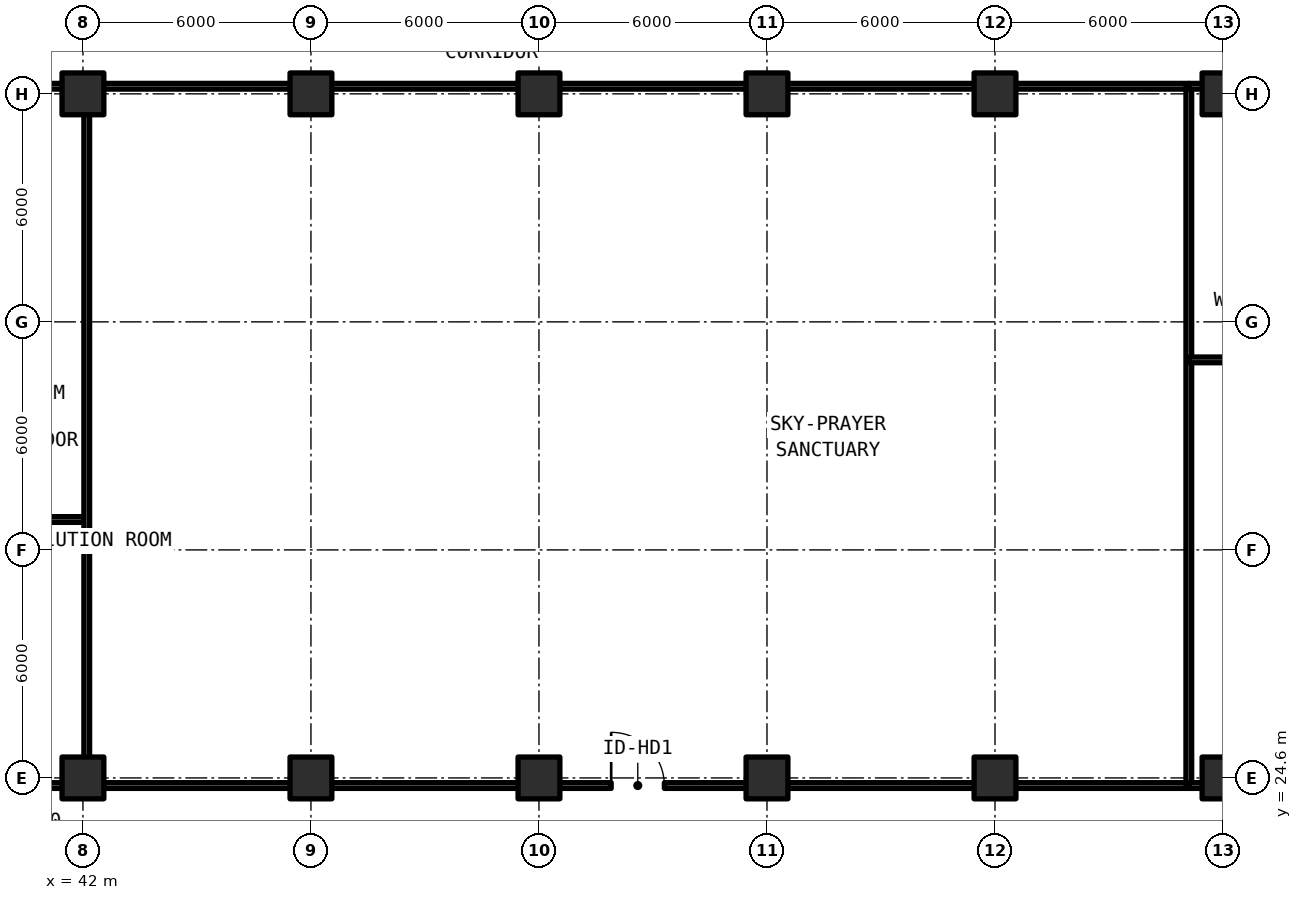
"""IFC4 building model, lengths in metres.
Left out: names, types, materials, properties, quantities, classifications, styles, units other than length and angle.
Written with IfcOpenShell. Run it as: python <this file> out.ifc"""

import sys

from ifc_helpers import new_model, si_unit, direction, frame, frame_2d, origin, origin_2d, place, context, subcontext, project, spatial, rectangle, extrude, element, fill, save


model = new_model("IFC4")
c1 = context("Model", 3, precision=1e-05, world=origin(), true_north=direction((0.0, 1.0)))
c2 = subcontext(c1, "Body", "Model", "MODEL_VIEW")
j1 = project(units=[si_unit("LENGTHUNIT", "METRE"), si_unit("PLANEANGLEUNIT", "RADIAN")], contexts=[c1])
p1 = place(None, origin())
s1 = spatial("IfcSite", under=j1, at=p1, CompositionType="ELEMENT")
p2 = place(p1, origin())
s2 = spatial("IfcBuilding", under=s1, at=p2, CompositionType="ELEMENT")
p3 = place(p2, frame((0.0, 0.0, 69.63)))
s3 = spatial("IfcBuildingStorey", under=s2, at=p3, CompositionType="ELEMENT", Elevation=69.63)
for number, where, z_axis, x_axis in (
    (1, (42.0, 24.6, 0.0), (0.0, 0.0, 1.0), (1.0, 0.0, 0.0)),
    (2, (42.0, 42.6, 0.0), (0.0, 0.0, 1.0), (1.0, 0.0, 0.0)),
    (3, (48.0, 24.6, 0.0), (0.0, 0.0, 1.0), (1.0, 0.0, 0.0)),
    (4, (48.0, 42.6, 0.0), (0.0, 0.0, 1.0), (1.0, 0.0, 0.0)),
    (5, (54.0, 24.6, 0.0), (0.0, 0.0, 1.0), (1.0, 0.0, 0.0)),
    (6, (54.0, 42.6, 0.0), (0.0, 0.0, 1.0), (1.0, 0.0, 0.0)),
    (7, (60.0, 24.6, 0.0), (0.0, 0.0, 1.0), (1.0, 0.0, 0.0)),
    (8, (60.0, 42.6, 0.0), (0.0, 0.0, 1.0), (1.0, 0.0, 0.0)),
    (9, (66.0, 24.6, 0.0), (0.0, 0.0, 1.0), (1.0, 0.0, 0.0)),
    (10, (66.0, 42.6, 0.0), (0.0, 0.0, 1.0), (1.0, 0.0, 0.0)),
    (11, (72.0, 24.6, 0.0), (0.0, 0.0, 1.0), (1.0, 0.0, 0.0)),
    (12, (72.0, 42.6, 0.0), (0.0, 0.0, 1.0), (1.0, 0.0, 0.0)),
):
    element("IfcColumn", number, at=place(p3, frame(where, z_axis=z_axis, x_axis=x_axis)), inside=s3, PredefinedType="COLUMN", context=c2, shape_type="SweptSolid", body=[
        extrude(rectangle(XDim=1.1, YDim=1.1, at=origin_2d()), origin(), (0.0, 0.0, 1.0), 3.63),
    ])
p4 = place(p3, frame((38.6, 24.4, 0.0), z_axis=(0.0, 0.0, 1.0), x_axis=(1.0, 0.0, 0.0)))
e13 = element("IfcWall", 13, at=p4, inside=s3, PredefinedType="SOLIDWALL", context=c2, shape_type="SweptSolid", body=[
    extrude(rectangle(XDim=3.5, YDim=0.15, at=frame_2d((1.75, 0.0))), origin(), (0.0, 0.0, 1.0), 2.565),
])
p5 = place(p3, frame((38.6, 31.4, 0.0), z_axis=(0.0, 0.0, 1.0), x_axis=(1.0, 0.0, 0.0)))
e14 = element("IfcWall", 14, at=p5, inside=s3, PredefinedType="SOLIDWALL", context=c2, shape_type="SweptSolid", body=[
    extrude(rectangle(XDim=3.5, YDim=0.15, at=frame_2d((1.75, 0.0))), origin(), (0.0, 0.0, 1.0), 2.57),
])
p6 = place(p3, frame((38.6, 42.8, 0.0), z_axis=(0.0, 0.0, 1.0), x_axis=(1.0, 0.0, 0.0)))
e15 = element("IfcWall", 15, at=p6, inside=s3, PredefinedType="SOLIDWALL", context=c2, shape_type="SweptSolid", body=[
    extrude(rectangle(XDim=3.5, YDim=0.15, at=frame_2d((1.75, 0.0))), origin(), (0.0, 0.0, 1.0), 2.565),
])
p7 = place(p3, frame((42.1, 24.4, 0.0), z_axis=(0.0, 0.0, 1.0), x_axis=(1.0, 0.0, 0.0)))
e16 = element("IfcWall", 16, at=p7, inside=s3, PredefinedType="SOLIDWALL", context=c2, shape_type="SweptSolid", body=[
    extrude(rectangle(XDim=29.0, YDim=0.15, at=frame_2d((14.5, 0.0))), origin(), (0.0, 0.0, 1.0), 2.565),
])
p8 = place(p7, frame((13.8, 0.0, 0.0)))
e17 = element("IfcOpeningElement", 17, at=p8, cuts=e16, PredefinedType="OPENING", context=c2, shape_type="SweptSolid", body=[
    extrude(rectangle(XDim=1.4, YDim=2.15, at=frame_2d((0.7, 1.075))), frame((0.0, 0.085, 0.0), z_axis=(0.0, -1.0, 0.0), x_axis=(1.0, 0.0, 0.0)), (0.0, 0.0, 1.0), 0.17),
])
p9 = place(p3, frame((42.1, 42.8, 0.0), z_axis=(0.0, 0.0, 1.0), x_axis=(1.0, 0.0, 0.0)))
e18 = element("IfcWall", 18, at=p9, inside=s3, PredefinedType="SOLIDWALL", context=c2, shape_type="SweptSolid", body=[
    extrude(rectangle(XDim=29.0, YDim=0.15, at=frame_2d((14.5, 0.0))), origin(), (0.0, 0.0, 1.0), 2.565),
])
for number, where, z_axis, x_axis in (
    (19, (42.1, 24.4, 0.0), (0.0, 0.0, 1.0), (0.0, 1.0, 0.0)),
    (20, (71.1, 24.4, 0.0), (0.0, 0.0, 1.0), (0.0, 1.0, 0.0)),
):
    element("IfcWall", number, at=place(p3, frame(where, z_axis=z_axis, x_axis=x_axis)), inside=s3, PredefinedType="SOLIDWALL", context=c2, shape_type="SweptSolid", body=[
        extrude(rectangle(XDim=18.4, YDim=0.15, at=frame_2d((9.2, 0.0))), origin(), (0.0, 0.0, 1.0), 2.57),
    ])
p10 = place(p3, frame((71.1, 24.4, 0.0), z_axis=(0.0, 0.0, 1.0), x_axis=(1.0, 0.0, 0.0)))
e21 = element("IfcWall", 21, at=p10, inside=s3, PredefinedType="SOLIDWALL", context=c2, shape_type="SweptSolid", body=[
    extrude(rectangle(XDim=4.3, YDim=0.15, at=frame_2d((2.15, 0.0))), origin(), (0.0, 0.0, 1.0), 2.565),
])
p11 = place(p3, frame((71.1, 35.6, 0.0), z_axis=(0.0, 0.0, 1.0), x_axis=(1.0, 0.0, 0.0)))
e22 = element("IfcWall", 22, at=p11, inside=s3, PredefinedType="SOLIDWALL", context=c2, shape_type="SweptSolid", body=[
    extrude(rectangle(XDim=4.3, YDim=0.15, at=frame_2d((2.15, 0.0))), origin(), (0.0, 0.0, 1.0), 2.57),
])
p12 = place(p3, frame((71.1, 42.8, 0.0), z_axis=(0.0, 0.0, 1.0), x_axis=(1.0, 0.0, 0.0)))
e23 = element("IfcWall", 23, at=p12, inside=s3, PredefinedType="SOLIDWALL", context=c2, shape_type="SweptSolid", body=[
    extrude(rectangle(XDim=4.3, YDim=0.15, at=frame_2d((2.15, 0.0))), origin(), (0.0, 0.0, 1.0), 2.565),
])
p13 = place(p8, origin())
e24 = element("IfcDoor", 24, at=p13, inside=s3, OperationType="SINGLE_SWING_RIGHT", PredefinedType="DOOR", context=c2, shape_type="SweptSolid", body=[
    extrude(rectangle(XDim=1.4, YDim=2.15, at=frame_2d((0.7, 1.075))), frame((0.0, 0.025, 0.0), z_axis=(0.0, -1.0, 0.0), x_axis=(1.0, 0.0, 0.0)), (0.0, 0.0, 1.0), 0.05),
])
fill(e17, e24)
save(model, sys.argv[1])
